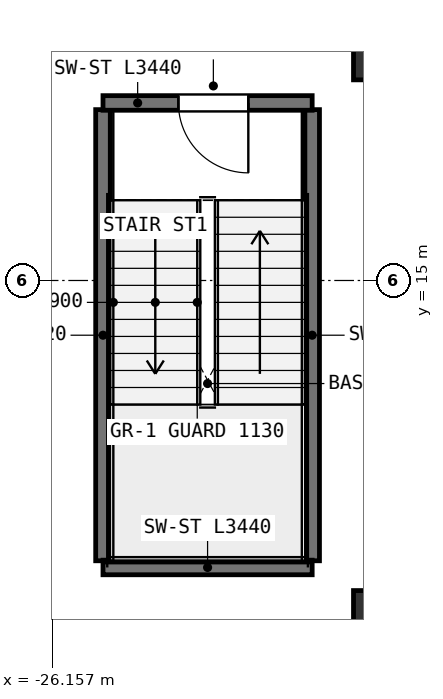
"""IFC4 building model, lengths in metres.
Left out: names, types, materials, properties, quantities, classifications, styles, units other than length and angle.
Written with IfcOpenShell. Run it as: python <this file> out.ifc"""

import sys

from ifc_helpers import new_model, si_unit, direction, frame, frame_2d, origin, origin_2d, place, context, subcontext, project, spatial, rectangle, extrude, element, fill, save


model = new_model("IFC4")
c1 = context("Model", 3, precision=1e-05, world=origin(), true_north=direction((0.0, 1.0)))
c2 = subcontext(c1, "Body", "Model", "MODEL_VIEW")
j1 = project(units=[si_unit("LENGTHUNIT", "METRE"), si_unit("PLANEANGLEUNIT", "RADIAN")], contexts=[c1])
p1 = place(None, origin())
s1 = spatial("IfcSite", under=j1, at=p1, CompositionType="ELEMENT")
p2 = place(p1, origin())
s2 = spatial("IfcBuilding", under=s1, at=p2, CompositionType="ELEMENT")
p3 = place(p2, frame((0.0, 0.0, -4.5)))
s3 = spatial("IfcBuildingStorey", under=s2, at=p3, CompositionType="ELEMENT", Elevation=-4.5)
for number, where, z_axis, x_axis in (
    (1, (-20.8, 9.4, 0.0), (0.0, 0.0, 1.0), (1.0, 0.0, 0.0)),
    (2, (-20.8, 18.8, 0.0), (0.0, 0.0, 1.0), (1.0, 0.0, 0.0)),
):
    element("IfcColumn", number, at=place(p3, frame(where, z_axis=z_axis, x_axis=x_axis)), inside=s3, PredefinedType="COLUMN", context=c2, shape_type="SweptSolid", body=[
        extrude(rectangle(XDim=0.8, YDim=1.0, at=origin_2d()), origin(), (0.0, 0.0, 1.0), 4.5),
    ])
for number, where, z_axis, x_axis in (
    (3, (-25.32, 10.39, 0.0), (0.0, 0.0, 1.0), (0.0, 1.0, 0.0)),
    (4, (-21.88, 10.39, 0.0), (0.0, 0.0, 1.0), (0.0, 1.0, 0.0)),
):
    element("IfcWall", number, at=place(p3, frame(where, z_axis=z_axis, x_axis=x_axis)), inside=s3, PredefinedType="SHEAR", context=c2, shape_type="SweptSolid", body=[
        extrude(rectangle(XDim=7.42, YDim=0.24, at=frame_2d((3.71, 0.0))), origin(), (0.0, 0.0, 1.0), 4.22),
    ])
p4 = place(p3, frame((-25.32, 10.28, 0.0), z_axis=(0.0, 0.0, 1.0), x_axis=(1.0, 0.0, 0.0)))
e5 = element("IfcWall", 5, at=p4, inside=s3, PredefinedType="SHEAR", context=c2, shape_type="SweptSolid", body=[
    extrude(rectangle(XDim=3.44, YDim=0.24, at=frame_2d((1.72, 0.0))), origin(), (0.0, 0.0, 1.0), 4.22),
])
p5 = place(p3, frame((-21.88, 17.92, 0.0), z_axis=(0.0, 0.0, 1.0), x_axis=(-1.0, 0.0, 0.0)))
e6 = element("IfcWall", 6, at=p5, inside=s3, PredefinedType="SHEAR", context=c2, shape_type="SweptSolid", body=[
    extrude(rectangle(XDim=3.44, YDim=0.24, at=frame_2d((1.72, 0.0))), origin(), (0.0, 0.0, 1.0), 4.22),
])
p6 = place(p5, frame((1.05, 0.0, 0.0)))
e7 = element("IfcOpeningElement", 7, at=p6, cuts=e6, PredefinedType="OPENING", context=c2, shape_type="SweptSolid", body=[
    extrude(rectangle(XDim=1.15, YDim=2.15, at=frame_2d((0.575, 1.075))), frame((0.0, 0.13, 0.0), z_axis=(0.0, -1.0, 0.0), x_axis=(1.0, 0.0, 0.0)), (0.0, 0.0, 1.0), 0.26),
])
p7 = place(p6, origin())
e8 = element("IfcDoor", 8, at=p7, inside=s3, OperationType="SINGLE_SWING_LEFT", PredefinedType="DOOR", context=c2, shape_type="SweptSolid", body=[
    extrude(rectangle(XDim=1.15, YDim=2.15, at=frame_2d((0.575, 1.075))), frame((0.0, 0.025, 0.0), z_axis=(0.0, -1.0, 0.0), x_axis=(1.0, 0.0, 0.0)), (0.0, 0.0, 1.0), 0.05),
])
fill(e7, e8)
save(model, sys.argv[1])
